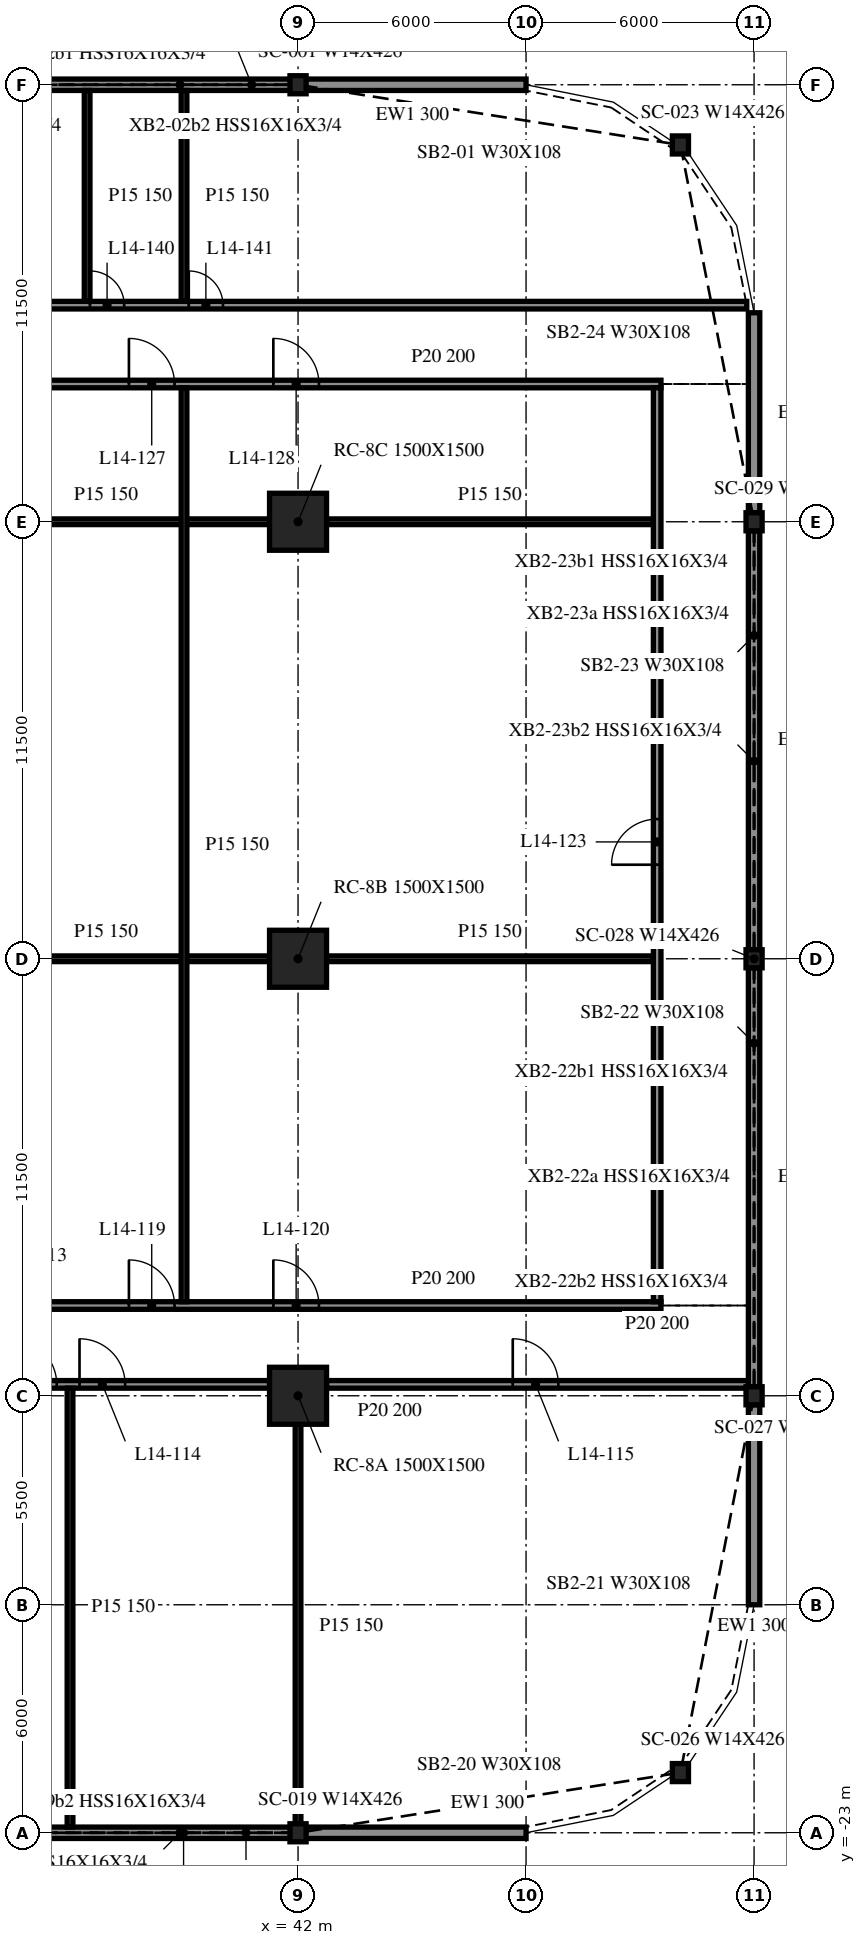
"""IFC4 building model, lengths in metres.
Left out: names, types, materials, properties, quantities, classifications, styles, units other than length and angle.
Written with IfcOpenShell. Run it as: python <this file> out.ifc"""

import sys

from ifc_helpers import new_model, si_unit, direction, frame, frame_2d, origin, origin_2d, place, context, subcontext, project, spatial, rectangle, i_section, extrude, element, fill, save


model = new_model("IFC4")
c1 = context("Model", 3, precision=1e-05, world=origin(), true_north=direction((0.0, 1.0)))
c2 = subcontext(c1, "Body", "Model", "MODEL_VIEW")
j1 = project(units=[si_unit("LENGTHUNIT", "METRE"), si_unit("PLANEANGLEUNIT", "RADIAN")], contexts=[c1])
p1 = place(None, origin())
s1 = spatial("IfcSite", under=j1, at=p1, CompositionType="ELEMENT")
p2 = place(p1, origin())
s2 = spatial("IfcBuilding", under=s1, at=p2, CompositionType="ELEMENT")
p3 = place(p2, frame((0.0, 0.0, 63.2)))
s3 = spatial("IfcBuildingStorey", under=s2, at=p3, CompositionType="ELEMENT", Elevation=63.2)
for number, where, z_axis, x_axis in (
    (1, (42.0, -11.5, -0.34), (0.0, 0.0, 1.0), (1.0, 0.0, 0.0)),
    (2, (42.0, 0.0, -0.34), (0.0, 0.0, 1.0), (1.0, 0.0, 0.0)),
    (3, (42.0, 11.5, -0.34), (0.0, 0.0, 1.0), (1.0, 0.0, 0.0)),
):
    element("IfcColumn", number, at=place(p3, frame(where, z_axis=z_axis, x_axis=x_axis)), inside=s3, PredefinedType="COLUMN", context=c2, shape_type="SweptSolid", body=[
        extrude(rectangle(XDim=1.5, YDim=1.5, at=origin_2d()), origin(), (0.0, 0.0, 1.0), 4.3),
    ])
for number, where, z_axis, x_axis in (
    (4, (52.062, 21.416, -0.34), (0.0, 0.0, 1.0), (1.0, 0.0, 0.0)),
    (5, (42.0, 23.0, -0.34), (0.0, 0.0, 1.0), (1.0, 0.0, 0.0)),
    (6, (42.0, -23.0, -0.34), (0.0, 0.0, 1.0), (1.0, 0.0, 0.0)),
    (7, (52.062, -21.416, -0.34), (0.0, 0.0, 1.0), (1.0, 0.0, 0.0)),
    (8, (54.0, -11.5, -0.34), (0.0, 0.0, 1.0), (1.0, 0.0, 0.0)),
    (9, (54.0, 0.0, -0.34), (0.0, 0.0, 1.0), (1.0, 0.0, 0.0)),
    (10, (54.0, 11.5, -0.34), (0.0, 0.0, 1.0), (1.0, 0.0, 0.0)),
):
    element("IfcColumn", number, at=place(p3, frame(where, z_axis=z_axis, x_axis=x_axis)), inside=s3, PredefinedType="COLUMN", context=c2, shape_type="SweptSolid", body=[
        extrude(i_section(OverallWidth=0.424, OverallDepth=0.475, WebThickness=0.048, FlangeThickness=0.077, at=origin_2d()), origin(), (0.0, 0.0, 1.0), 4.3),
    ])
p4 = place(p3, frame((48.0, 23.0, 0.0), z_axis=(0.0, 0.0, 1.0), x_axis=(-1.0, 0.0, 0.0)))
e11 = element("IfcWall", 11, at=p4, inside=s3, PredefinedType="NOTDEFINED", context=c2, shape_type="SweptSolid", body=[
    extrude(rectangle(XDim=5.976, YDim=0.3, at=frame_2d((2.988, 0.0))), origin(), (0.0, 0.0, 1.0), 3.203),
])
for number, where, z_axis, x_axis in (
    (12, (41.976, 23.0, 0.0), (0.0, 0.0, 1.0), (-1.0, 0.0, 0.0)),
    (13, (30.024, -23.0, 0.0), (0.0, 0.0, 1.0), (1.0, 0.0, 0.0)),
):
    element("IfcWall", number, at=place(p3, frame(where, z_axis=z_axis, x_axis=x_axis)), inside=s3, PredefinedType="NOTDEFINED", context=c2, shape_type="SweptSolid", body=[
        extrude(rectangle(XDim=11.952, YDim=0.3, at=frame_2d((5.976, 0.0))), origin(), (0.0, 0.0, 1.0), 3.203),
    ])
p5 = place(p3, frame((42.024, -23.0, 0.0), z_axis=(0.0, 0.0, 1.0), x_axis=(1.0, 0.0, 0.0)))
e14 = element("IfcWall", 14, at=p5, inside=s3, PredefinedType="NOTDEFINED", context=c2, shape_type="SweptSolid", body=[
    extrude(rectangle(XDim=5.976, YDim=0.3, at=frame_2d((2.988, 0.0))), origin(), (0.0, 0.0, 1.0), 3.203),
])
p6 = place(p3, frame((54.0, -17.0, 0.0), z_axis=(0.0, 0.0, 1.0), x_axis=(0.0, 1.0, 0.0)))
e15 = element("IfcWall", 15, at=p6, inside=s3, PredefinedType="NOTDEFINED", context=c2, shape_type="SweptSolid", body=[
    extrude(rectangle(XDim=5.262, YDim=0.3, at=frame_2d((2.631, 0.0))), origin(), (0.0, 0.0, 1.0), 3.203),
])
for number, where, z_axis, x_axis in (
    (16, (54.0, -11.262, 0.0), (0.0, 0.0, 1.0), (0.0, 1.0, 0.0)),
    (17, (54.0, 0.238, 0.0), (0.0, 0.0, 1.0), (0.0, 1.0, 0.0)),
):
    element("IfcWall", number, at=place(p3, frame(where, z_axis=z_axis, x_axis=x_axis)), inside=s3, PredefinedType="NOTDEFINED", context=c2, shape_type="SweptSolid", body=[
        extrude(rectangle(XDim=11.024, YDim=0.3, at=frame_2d((5.512, 0.0))), origin(), (0.0, 0.0, 1.0), 3.203),
    ])
p7 = place(p3, frame((54.0, 11.738, 0.0), z_axis=(0.0, 0.0, 1.0), x_axis=(0.0, 1.0, 0.0)))
e18 = element("IfcWall", 18, at=p7, inside=s3, PredefinedType="NOTDEFINED", context=c2, shape_type="SweptSolid", body=[
    extrude(rectangle(XDim=5.262, YDim=0.3, at=frame_2d((2.631, 0.0))), origin(), (0.0, 0.0, 1.0), 3.203),
])
p8 = place(p3, frame((30.75, -11.2, 0.0), z_axis=(0.0, 0.0, 1.0), x_axis=(1.0, 0.0, 0.0)))
e19 = element("IfcWall", 19, at=p8, inside=s3, PredefinedType="PARTITIONING", context=c2, shape_type="SweptSolid", body=[
    extrude(rectangle(XDim=10.5, YDim=0.2, at=frame_2d((5.25, 0.0))), origin(), (0.0, 0.0, 1.0), 3.96),
])
p9 = place(p8, frame((0.7, 0.0, 0.0)))
e20 = element("IfcOpeningElement", 20, at=p9, cuts=e19, PredefinedType="OPENING", context=c2, shape_type="SweptSolid", body=[
    extrude(rectangle(XDim=1.2, YDim=2.1, at=frame_2d((0.6, 1.05))), frame((0.0, 0.11, 0.0), z_axis=(0.0, -1.0, 0.0), x_axis=(1.0, 0.0, 0.0)), (0.0, 0.0, 1.0), 0.22),
])
p10 = place(p8, frame((3.7, 0.0, 0.0)))
e21 = element("IfcOpeningElement", 21, at=p10, cuts=e19, PredefinedType="OPENING", context=c2, shape_type="SweptSolid", body=[
    extrude(rectangle(XDim=1.2, YDim=2.1, at=frame_2d((0.6, 1.05))), frame((0.0, 0.11, 0.0), z_axis=(0.0, -1.0, 0.0), x_axis=(1.0, 0.0, 0.0)), (0.0, 0.0, 1.0), 0.22),
])
p11 = place(p8, frame((5.5, 0.0, 0.0)))
e22 = element("IfcOpeningElement", 22, at=p11, cuts=e19, PredefinedType="OPENING", context=c2, shape_type="SweptSolid", body=[
    extrude(rectangle(XDim=1.2, YDim=2.1, at=frame_2d((0.6, 1.05))), frame((0.0, 0.11, 0.0), z_axis=(0.0, -1.0, 0.0), x_axis=(1.0, 0.0, 0.0)), (0.0, 0.0, 1.0), 0.22),
])
p12 = place(p3, frame((42.75, -11.2, 0.0), z_axis=(0.0, 0.0, 1.0), x_axis=(1.0, 0.0, 0.0)))
e23 = element("IfcWall", 23, at=p12, inside=s3, PredefinedType="PARTITIONING", context=c2, shape_type="SweptSolid", body=[
    extrude(rectangle(XDim=11.1, YDim=0.2, at=frame_2d((5.55, 0.0))), origin(), (0.0, 0.0, 1.0), 3.96),
])
p13 = place(p12, frame((4.9, 0.0, 0.0)))
e24 = element("IfcOpeningElement", 24, at=p13, cuts=e23, PredefinedType="OPENING", context=c2, shape_type="SweptSolid", body=[
    extrude(rectangle(XDim=1.2, YDim=2.1, at=frame_2d((0.6, 1.05))), frame((0.0, 0.11, 0.0), z_axis=(0.0, -1.0, 0.0), x_axis=(1.0, 0.0, 0.0)), (0.0, 0.0, 1.0), 0.22),
])
p14 = place(p3, frame((32.45, -9.125, 0.0), z_axis=(0.0, 0.0, 1.0), x_axis=(1.0, 0.0, 0.0)))
e25 = element("IfcWall", 25, at=p14, inside=s3, PredefinedType="PARTITIONING", context=c2, shape_type="SweptSolid", body=[
    extrude(rectangle(XDim=19.1, YDim=0.2, at=frame_2d((9.55, 0.0))), origin(), (0.0, 0.0, 1.0), 3.96),
])
p15 = place(p14, frame((5.1, 0.0, 0.0)))
e26 = element("IfcOpeningElement", 26, at=p15, cuts=e25, PredefinedType="OPENING", context=c2, shape_type="SweptSolid", body=[
    extrude(rectangle(XDim=1.2, YDim=2.1, at=frame_2d((0.6, 1.05))), frame((0.0, 0.11, 0.0), z_axis=(0.0, -1.0, 0.0), x_axis=(1.0, 0.0, 0.0)), (0.0, 0.0, 1.0), 0.22),
])
p16 = place(p14, frame((8.9, 0.0, 0.0)))
e27 = element("IfcOpeningElement", 27, at=p16, cuts=e25, PredefinedType="OPENING", context=c2, shape_type="SweptSolid", body=[
    extrude(rectangle(XDim=1.2, YDim=2.1, at=frame_2d((0.6, 1.05))), frame((0.0, 0.11, 0.0), z_axis=(0.0, -1.0, 0.0), x_axis=(1.0, 0.0, 0.0)), (0.0, 0.0, 1.0), 0.22),
])
for number, where, z_axis, x_axis in (
    (28, (32.65, 0.0, 0.0), (0.0, 0.0, 1.0), (1.0, 0.0, 0.0)),
    (29, (42.75, 0.0, 0.0), (0.0, 0.0, 1.0), (1.0, 0.0, 0.0)),
    (30, (32.65, 11.5, 0.0), (0.0, 0.0, 1.0), (1.0, 0.0, 0.0)),
    (31, (42.75, 11.5, 0.0), (0.0, 0.0, 1.0), (1.0, 0.0, 0.0)),
):
    element("IfcWall", number, at=place(p3, frame(where, z_axis=z_axis, x_axis=x_axis)), inside=s3, PredefinedType="PARTITIONING", context=c2, shape_type="SweptSolid", body=[
        extrude(rectangle(XDim=8.6, YDim=0.15, at=frame_2d((4.3, 0.0))), origin(), (0.0, 0.0, 1.0), 3.96),
    ])
p17 = place(p3, frame((32.45, 15.125, 0.0), z_axis=(0.0, 0.0, 1.0), x_axis=(1.0, 0.0, 0.0)))
e32 = element("IfcWall", 32, at=p17, inside=s3, PredefinedType="PARTITIONING", context=c2, shape_type="SweptSolid", body=[
    extrude(rectangle(XDim=19.1, YDim=0.2, at=frame_2d((9.55, 0.0))), origin(), (0.0, 0.0, 1.0), 3.96),
])
p18 = place(p17, frame((5.1, 0.0, 0.0)))
e33 = element("IfcOpeningElement", 33, at=p18, cuts=e32, PredefinedType="OPENING", context=c2, shape_type="SweptSolid", body=[
    extrude(rectangle(XDim=1.2, YDim=2.1, at=frame_2d((0.6, 1.05))), frame((0.0, 0.11, 0.0), z_axis=(0.0, -1.0, 0.0), x_axis=(1.0, 0.0, 0.0)), (0.0, 0.0, 1.0), 0.22),
])
p19 = place(p17, frame((8.9, 0.0, 0.0)))
e34 = element("IfcOpeningElement", 34, at=p19, cuts=e32, PredefinedType="OPENING", context=c2, shape_type="SweptSolid", body=[
    extrude(rectangle(XDim=1.2, YDim=2.1, at=frame_2d((0.6, 1.05))), frame((0.0, 0.11, 0.0), z_axis=(0.0, -1.0, 0.0), x_axis=(1.0, 0.0, 0.0)), (0.0, 0.0, 1.0), 0.22),
])
p20 = place(p3, frame((-41.975, 17.2, 0.0), z_axis=(0.0, 0.0, 1.0), x_axis=(1.0, 0.0, 0.0)))
e35 = element("IfcWall", 35, at=p20, inside=s3, PredefinedType="PARTITIONING", context=c2, shape_type="SweptSolid", body=[
    extrude(rectangle(XDim=95.782, YDim=0.2, at=frame_2d((47.891, 0.0))), origin(), (0.0, 0.0, 1.0), 3.96),
])
p21 = place(p20, frame((13.7, 0.0, 0.0)))
e36 = element("IfcOpeningElement", 36, at=p21, cuts=e35, PredefinedType="OPENING", context=c2, shape_type="SweptSolid", body=[
    extrude(rectangle(XDim=0.9, YDim=2.1, at=frame_2d((0.45, 1.05))), frame((0.0, 0.11, 0.0), z_axis=(0.0, -1.0, 0.0), x_axis=(1.0, 0.0, 0.0)), (0.0, 0.0, 1.0), 0.22),
])
p22 = place(p20, frame((19.7, 0.0, 0.0)))
e37 = element("IfcOpeningElement", 37, at=p22, cuts=e35, PredefinedType="OPENING", context=c2, shape_type="SweptSolid", body=[
    extrude(rectangle(XDim=0.9, YDim=2.1, at=frame_2d((0.45, 1.05))), frame((0.0, 0.11, 0.0), z_axis=(0.0, -1.0, 0.0), x_axis=(1.0, 0.0, 0.0)), (0.0, 0.0, 1.0), 0.22),
])
p23 = place(p20, frame((23.1, 0.0, 0.0)))
e38 = element("IfcOpeningElement", 38, at=p23, cuts=e35, PredefinedType="OPENING", context=c2, shape_type="SweptSolid", body=[
    extrude(rectangle(XDim=0.9, YDim=2.1, at=frame_2d((0.45, 1.05))), frame((0.0, 0.11, 0.0), z_axis=(0.0, -1.0, 0.0), x_axis=(1.0, 0.0, 0.0)), (0.0, 0.0, 1.0), 0.22),
])
p24 = place(p20, frame((25.7, 0.0, 0.0)))
e39 = element("IfcOpeningElement", 39, at=p24, cuts=e35, PredefinedType="OPENING", context=c2, shape_type="SweptSolid", body=[
    extrude(rectangle(XDim=0.9, YDim=2.1, at=frame_2d((0.45, 1.05))), frame((0.0, 0.11, 0.0), z_axis=(0.0, -1.0, 0.0), x_axis=(1.0, 0.0, 0.0)), (0.0, 0.0, 1.0), 0.22),
])
p25 = place(p20, frame((40.7, 0.0, 0.0)))
e40 = element("IfcOpeningElement", 40, at=p25, cuts=e35, PredefinedType="OPENING", context=c2, shape_type="SweptSolid", body=[
    extrude(rectangle(XDim=0.9, YDim=2.1, at=frame_2d((0.45, 1.05))), frame((0.0, 0.11, 0.0), z_axis=(0.0, -1.0, 0.0), x_axis=(1.0, 0.0, 0.0)), (0.0, 0.0, 1.0), 0.22),
])
p26 = place(p20, frame((46.7, 0.0, 0.0)))
e41 = element("IfcOpeningElement", 41, at=p26, cuts=e35, PredefinedType="OPENING", context=c2, shape_type="SweptSolid", body=[
    extrude(rectangle(XDim=0.9, YDim=2.1, at=frame_2d((0.45, 1.05))), frame((0.0, 0.11, 0.0), z_axis=(0.0, -1.0, 0.0), x_axis=(1.0, 0.0, 0.0)), (0.0, 0.0, 1.0), 0.22),
])
p27 = place(p20, frame((48.1, 0.0, 0.0)))
e42 = element("IfcOpeningElement", 42, at=p27, cuts=e35, PredefinedType="OPENING", context=c2, shape_type="SweptSolid", body=[
    extrude(rectangle(XDim=0.9, YDim=2.1, at=frame_2d((0.45, 1.05))), frame((0.0, 0.11, 0.0), z_axis=(0.0, -1.0, 0.0), x_axis=(1.0, 0.0, 0.0)), (0.0, 0.0, 1.0), 0.22),
])
p28 = place(p20, frame((51.5, 0.0, 0.0)))
e43 = element("IfcOpeningElement", 43, at=p28, cuts=e35, PredefinedType="OPENING", context=c2, shape_type="SweptSolid", body=[
    extrude(rectangle(XDim=0.9, YDim=2.1, at=frame_2d((0.45, 1.05))), frame((0.0, 0.11, 0.0), z_axis=(0.0, -1.0, 0.0), x_axis=(1.0, 0.0, 0.0)), (0.0, 0.0, 1.0), 0.22),
])
p29 = place(p20, frame((54.1, 0.0, 0.0)))
e44 = element("IfcOpeningElement", 44, at=p29, cuts=e35, PredefinedType="OPENING", context=c2, shape_type="SweptSolid", body=[
    extrude(rectangle(XDim=0.9, YDim=2.1, at=frame_2d((0.45, 1.05))), frame((0.0, 0.11, 0.0), z_axis=(0.0, -1.0, 0.0), x_axis=(1.0, 0.0, 0.0)), (0.0, 0.0, 1.0), 0.22),
])
p30 = place(p20, frame((69.1, 0.0, 0.0)))
e45 = element("IfcOpeningElement", 45, at=p30, cuts=e35, PredefinedType="OPENING", context=c2, shape_type="SweptSolid", body=[
    extrude(rectangle(XDim=0.9, YDim=2.1, at=frame_2d((0.45, 1.05))), frame((0.0, 0.11, 0.0), z_axis=(0.0, -1.0, 0.0), x_axis=(1.0, 0.0, 0.0)), (0.0, 0.0, 1.0), 0.22),
])
p31 = place(p20, frame((75.1, 0.0, 0.0)))
e46 = element("IfcOpeningElement", 46, at=p31, cuts=e35, PredefinedType="OPENING", context=c2, shape_type="SweptSolid", body=[
    extrude(rectangle(XDim=0.9, YDim=2.1, at=frame_2d((0.45, 1.05))), frame((0.0, 0.11, 0.0), z_axis=(0.0, -1.0, 0.0), x_axis=(1.0, 0.0, 0.0)), (0.0, 0.0, 1.0), 0.22),
])
p32 = place(p20, frame((78.5, 0.0, 0.0)))
e47 = element("IfcOpeningElement", 47, at=p32, cuts=e35, PredefinedType="OPENING", context=c2, shape_type="SweptSolid", body=[
    extrude(rectangle(XDim=0.9, YDim=2.1, at=frame_2d((0.45, 1.05))), frame((0.0, 0.11, 0.0), z_axis=(0.0, -1.0, 0.0), x_axis=(1.0, 0.0, 0.0)), (0.0, 0.0, 1.0), 0.22),
])
p33 = place(p20, frame((81.1, 0.0, 0.0)))
e48 = element("IfcOpeningElement", 48, at=p33, cuts=e35, PredefinedType="OPENING", context=c2, shape_type="SweptSolid", body=[
    extrude(rectangle(XDim=0.9, YDim=2.1, at=frame_2d((0.45, 1.05))), frame((0.0, 0.11, 0.0), z_axis=(0.0, -1.0, 0.0), x_axis=(1.0, 0.0, 0.0)), (0.0, 0.0, 1.0), 0.22),
])
p34 = place(p3, frame((36.0, -22.85, 0.0), z_axis=(0.0, 0.0, 1.0), x_axis=(0.0, 1.0, 0.0)))
e49 = element("IfcWall", 49, at=p34, inside=s3, PredefinedType="PARTITIONING", context=c2, shape_type="SweptSolid", body=[
    extrude(rectangle(XDim=11.55, YDim=0.15, at=frame_2d((5.775, 0.0))), origin(), (0.0, 0.0, 1.0), 3.96),
])
p35 = place(p3, frame((36.45, 17.3, 0.0), z_axis=(0.0, 0.0, 1.0), x_axis=(0.0, 1.0, 0.0)))
e50 = element("IfcWall", 50, at=p35, inside=s3, PredefinedType="PARTITIONING", context=c2, shape_type="SweptSolid", body=[
    extrude(rectangle(XDim=5.55, YDim=0.15, at=frame_2d((2.775, 0.0))), origin(), (0.0, 0.0, 1.0), 3.96),
])
p36 = place(p3, frame((39.0, -9.025, 0.0), z_axis=(0.0, 0.0, 1.0), x_axis=(0.0, 1.0, 0.0)))
e51 = element("IfcWall", 51, at=p36, inside=s3, PredefinedType="PARTITIONING", context=c2, shape_type="SweptSolid", body=[
    extrude(rectangle(XDim=24.05, YDim=0.15, at=frame_2d((12.025, 0.0))), origin(), (0.0, 0.0, 1.0), 3.96),
])
p37 = place(p3, frame((39.0, 17.3, 0.0), z_axis=(0.0, 0.0, 1.0), x_axis=(0.0, 1.0, 0.0)))
e52 = element("IfcWall", 52, at=p37, inside=s3, PredefinedType="PARTITIONING", context=c2, shape_type="SweptSolid", body=[
    extrude(rectangle(XDim=5.55, YDim=0.15, at=frame_2d((2.775, 0.0))), origin(), (0.0, 0.0, 1.0), 3.96),
])
p38 = place(p3, frame((42.0, -22.85, 0.0), z_axis=(0.0, 0.0, 1.0), x_axis=(0.0, 1.0, 0.0)))
e53 = element("IfcWall", 53, at=p38, inside=s3, PredefinedType="PARTITIONING", context=c2, shape_type="SweptSolid", body=[
    extrude(rectangle(XDim=10.6, YDim=0.15, at=frame_2d((5.3, 0.0))), origin(), (0.0, 0.0, 1.0), 3.96),
])
p39 = place(p3, frame((51.45, -9.025, 0.0), z_axis=(0.0, 0.0, 1.0), x_axis=(0.0, 1.0, 0.0)))
e54 = element("IfcWall", 54, at=p39, inside=s3, PredefinedType="PARTITIONING", context=c2, shape_type="SweptSolid", body=[
    extrude(rectangle(XDim=24.05, YDim=0.2, at=frame_2d((12.025, 0.0))), origin(), (0.0, 0.0, 1.0), 3.96),
])
p40 = place(p39, frame((11.5, 0.0, 0.0)))
e55 = element("IfcOpeningElement", 55, at=p40, cuts=e54, PredefinedType="OPENING", context=c2, shape_type="SweptSolid", body=[
    extrude(rectangle(XDim=1.2, YDim=2.1, at=frame_2d((0.6, 1.05))), frame((0.0, 0.11, 0.0), z_axis=(0.0, -1.0, 0.0), x_axis=(1.0, 0.0, 0.0)), (0.0, 0.0, 1.0), 0.22),
])
p41 = place(p10, origin())
e56 = element("IfcDoor", 56, at=p41, inside=s3, OperationType="SINGLE_SWING_RIGHT", PredefinedType="DOOR", context=c2, shape_type="SweptSolid", body=[
    extrude(rectangle(XDim=1.2, YDim=2.1, at=frame_2d((0.6, 1.05))), frame((0.0, 0.025, 0.0), z_axis=(0.0, -1.0, 0.0), x_axis=(1.0, 0.0, 0.0)), (0.0, 0.0, 1.0), 0.05),
])
fill(e21, e56)
p42 = place(p11, origin())
e57 = element("IfcDoor", 57, at=p42, inside=s3, OperationType="SINGLE_SWING_LEFT", PredefinedType="DOOR", context=c2, shape_type="SweptSolid", body=[
    extrude(rectangle(XDim=1.2, YDim=2.1, at=frame_2d((0.6, 1.05))), frame((0.0, 0.025, 0.0), z_axis=(0.0, -1.0, 0.0), x_axis=(1.0, 0.0, 0.0)), (0.0, 0.0, 1.0), 0.05),
])
fill(e22, e57)
p43 = place(p13, origin())
e58 = element("IfcDoor", 58, at=p43, inside=s3, OperationType="SINGLE_SWING_RIGHT", PredefinedType="DOOR", context=c2, shape_type="SweptSolid", body=[
    extrude(rectangle(XDim=1.2, YDim=2.1, at=frame_2d((0.6, 1.05))), frame((0.0, 0.025, 0.0), z_axis=(0.0, -1.0, 0.0), x_axis=(1.0, 0.0, 0.0)), (0.0, 0.0, 1.0), 0.05),
])
fill(e24, e58)
p44 = place(p15, origin())
e59 = element("IfcDoor", 59, at=p44, inside=s3, OperationType="SINGLE_SWING_LEFT", PredefinedType="DOOR", context=c2, shape_type="SweptSolid", body=[
    extrude(rectangle(XDim=1.2, YDim=2.1, at=frame_2d((0.6, 1.05))), frame((0.0, 0.025, 0.0), z_axis=(0.0, -1.0, 0.0), x_axis=(1.0, 0.0, 0.0)), (0.0, 0.0, 1.0), 0.05),
])
fill(e26, e59)
p45 = place(p16, origin())
e60 = element("IfcDoor", 60, at=p45, inside=s3, OperationType="SINGLE_SWING_LEFT", PredefinedType="DOOR", context=c2, shape_type="SweptSolid", body=[
    extrude(rectangle(XDim=1.2, YDim=2.1, at=frame_2d((0.6, 1.05))), frame((0.0, 0.025, 0.0), z_axis=(0.0, -1.0, 0.0), x_axis=(1.0, 0.0, 0.0)), (0.0, 0.0, 1.0), 0.05),
])
fill(e27, e60)
p46 = place(p40, origin())
e61 = element("IfcDoor", 61, at=p46, inside=s3, OperationType="SINGLE_SWING_RIGHT", PredefinedType="DOOR", context=c2, shape_type="SweptSolid", body=[
    extrude(rectangle(XDim=1.2, YDim=2.1, at=frame_2d((0.6, 1.05))), frame((0.0, 0.025, 0.0), z_axis=(0.0, -1.0, 0.0), x_axis=(1.0, 0.0, 0.0)), (0.0, 0.0, 1.0), 0.05),
])
fill(e55, e61)
p47 = place(p18, origin())
e62 = element("IfcDoor", 62, at=p47, inside=s3, OperationType="SINGLE_SWING_RIGHT", PredefinedType="DOOR", context=c2, shape_type="SweptSolid", body=[
    extrude(rectangle(XDim=1.2, YDim=2.1, at=frame_2d((0.6, 1.05))), frame((0.0, 0.025, 0.0), z_axis=(0.0, -1.0, 0.0), x_axis=(1.0, 0.0, 0.0)), (0.0, 0.0, 1.0), 0.05),
])
fill(e33, e62)
p48 = place(p19, origin())
e63 = element("IfcDoor", 63, at=p48, inside=s3, OperationType="SINGLE_SWING_RIGHT", PredefinedType="DOOR", context=c2, shape_type="SweptSolid", body=[
    extrude(rectangle(XDim=1.2, YDim=2.1, at=frame_2d((0.6, 1.05))), frame((0.0, 0.025, 0.0), z_axis=(0.0, -1.0, 0.0), x_axis=(1.0, 0.0, 0.0)), (0.0, 0.0, 1.0), 0.05),
])
fill(e34, e63)
p49 = place(p32, origin())
e64 = element("IfcDoor", 64, at=p49, inside=s3, OperationType="SINGLE_SWING_RIGHT", PredefinedType="DOOR", context=c2, shape_type="SweptSolid", body=[
    extrude(rectangle(XDim=0.9, YDim=2.1, at=frame_2d((0.45, 1.05))), frame((0.0, 0.025, 0.0), z_axis=(0.0, -1.0, 0.0), x_axis=(1.0, 0.0, 0.0)), (0.0, 0.0, 1.0), 0.05),
])
fill(e47, e64)
p50 = place(p33, origin())
e65 = element("IfcDoor", 65, at=p50, inside=s3, OperationType="SINGLE_SWING_RIGHT", PredefinedType="DOOR", context=c2, shape_type="SweptSolid", body=[
    extrude(rectangle(XDim=0.9, YDim=2.1, at=frame_2d((0.45, 1.05))), frame((0.0, 0.025, 0.0), z_axis=(0.0, -1.0, 0.0), x_axis=(1.0, 0.0, 0.0)), (0.0, 0.0, 1.0), 0.05),
])
fill(e48, e65)
save(model, sys.argv[1])
